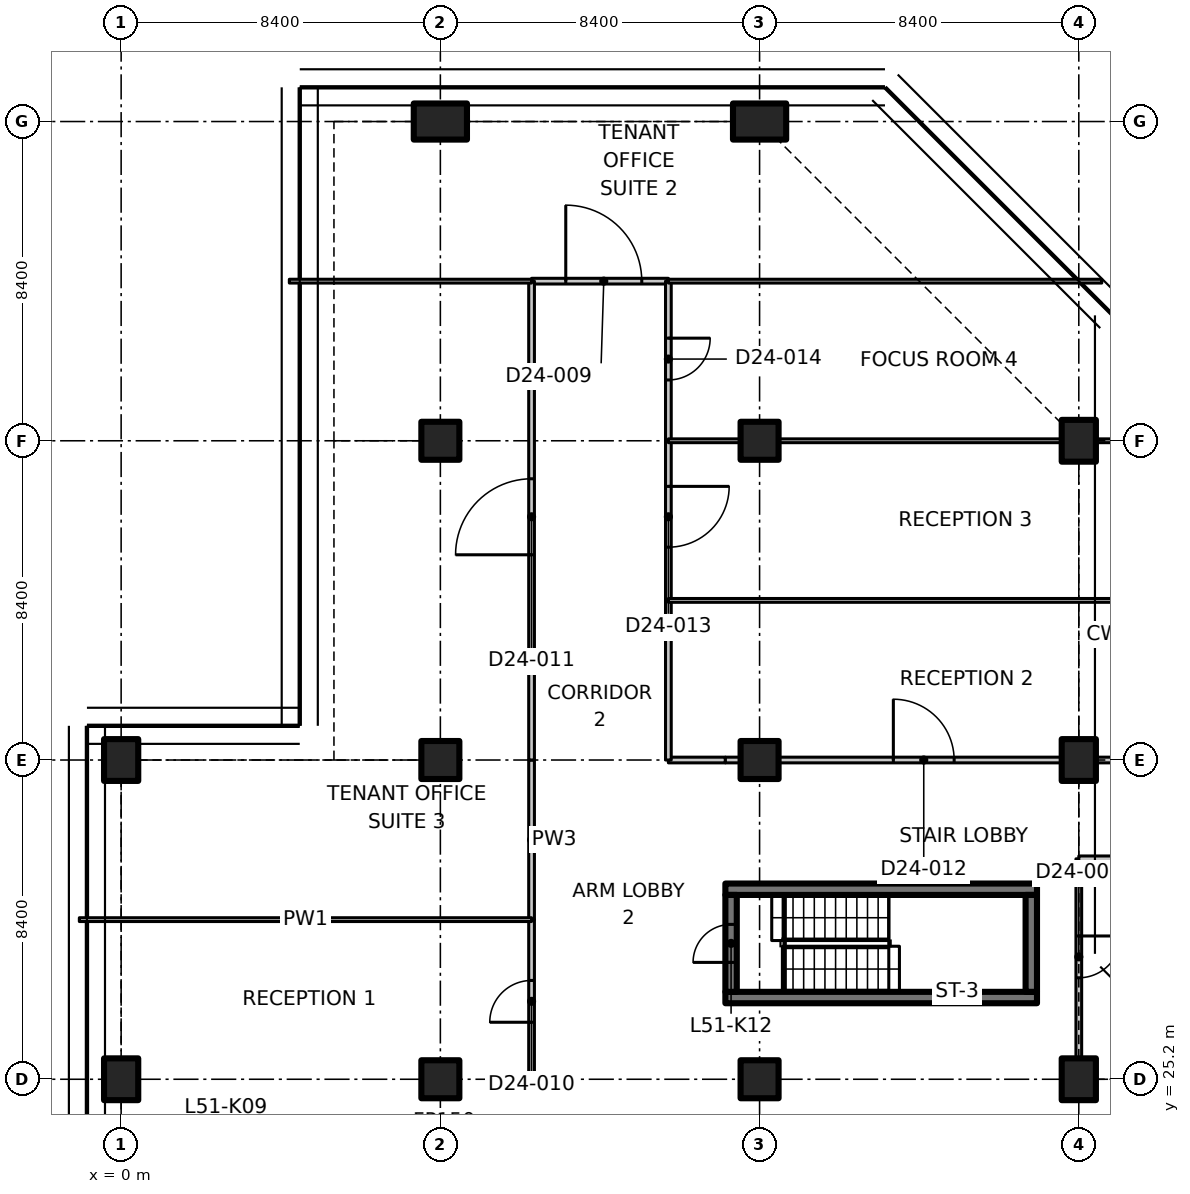
"""IFC4 building model, lengths in metres.
Left out: names, types, materials, properties, quantities, classifications, styles, units other than length and angle.
Written with IfcOpenShell. Run it as: python <this file> out.ifc"""

import sys

from ifc_helpers import new_model, si_unit, direction, frame, frame_2d, origin, origin_2d, place, context, subcontext, project, spatial, polyline, rectangle, outline, extrude, element, fill, save


model = new_model("IFC4")
c1 = context("Model", 3, precision=1e-05, world=origin(), true_north=direction((0.0, 1.0)))
c2 = subcontext(c1, "Body", "Model", "MODEL_VIEW")
j1 = project(units=[si_unit("LENGTHUNIT", "METRE"), si_unit("PLANEANGLEUNIT", "RADIAN")], contexts=[c1])
p1 = place(None, origin())
s1 = spatial("IfcSite", under=j1, at=p1, CompositionType="ELEMENT")
p2 = place(p1, origin())
s2 = spatial("IfcBuilding", under=s1, at=p2, CompositionType="ELEMENT")
p3 = place(p2, frame((0.0, 0.0, 202.8)))
s3 = spatial("IfcBuildingStorey", under=s2, at=p3, CompositionType="ELEMENT", Elevation=202.8)
for number, where, z_axis, x_axis in (
    (1, (0.0, 25.2, 0.0), (0.0, 0.0, 1.0), (1.0, 0.0, 0.0)),
    (2, (0.0, 33.6, 0.0), (0.0, 0.0, 1.0), (1.0, 0.0, 0.0)),
):
    element("IfcColumn", number, at=place(p3, frame(where, z_axis=z_axis, x_axis=x_axis)), inside=s3, PredefinedType="COLUMN", context=c2, shape_type="SweptSolid", body=[
        extrude(rectangle(XDim=0.9, YDim=1.1, at=origin_2d()), origin(), (0.0, 0.0, 1.0), 3.3),
    ])
for number, where, z_axis, x_axis in (
    (3, (8.4, 25.2, 0.0), (0.0, 0.0, 1.0), (1.0, 0.0, 0.0)),
    (4, (8.4, 33.6, 0.0), (0.0, 0.0, 1.0), (1.0, 0.0, 0.0)),
    (5, (8.4, 42.0, 0.0), (0.0, 0.0, 1.0), (1.0, 0.0, 0.0)),
):
    element("IfcColumn", number, at=place(p3, frame(where, z_axis=z_axis, x_axis=x_axis)), inside=s3, PredefinedType="COLUMN", context=c2, shape_type="SweptSolid", body=[
        extrude(rectangle(XDim=1.0, YDim=1.0, at=origin_2d()), origin(), (0.0, 0.0, 1.0), 3.3),
    ])
p4 = place(p3, frame((8.4, 50.4, 0.0), z_axis=(0.0, 0.0, 1.0), x_axis=(0.0, 1.0, 0.0)))
e6 = element("IfcColumn", 6, at=p4, inside=s3, PredefinedType="COLUMN", context=c2, shape_type="SweptSolid", body=[
    extrude(rectangle(XDim=0.95, YDim=1.4, at=origin_2d()), origin(), (0.0, 0.0, 1.0), 3.3),
])
for number, where, z_axis, x_axis in (
    (7, (16.8, 25.2, 0.0), (0.0, 0.0, 1.0), (1.0, 0.0, 0.0)),
    (8, (16.8, 33.6, 0.0), (0.0, 0.0, 1.0), (1.0, 0.0, 0.0)),
    (9, (16.8, 42.0, 0.0), (0.0, 0.0, 1.0), (1.0, 0.0, 0.0)),
):
    element("IfcColumn", number, at=place(p3, frame(where, z_axis=z_axis, x_axis=x_axis)), inside=s3, PredefinedType="COLUMN", context=c2, shape_type="SweptSolid", body=[
        extrude(rectangle(XDim=1.0, YDim=1.0, at=origin_2d()), origin(), (0.0, 0.0, 1.0), 3.3),
    ])
p5 = place(p3, frame((16.8, 50.4, 0.0), z_axis=(0.0, 0.0, 1.0), x_axis=(0.0, 1.0, 0.0)))
e10 = element("IfcColumn", 10, at=p5, inside=s3, PredefinedType="COLUMN", context=c2, shape_type="SweptSolid", body=[
    extrude(rectangle(XDim=0.95, YDim=1.4, at=origin_2d()), origin(), (0.0, 0.0, 1.0), 3.3),
])
for number, where, z_axis, x_axis in (
    (11, (25.2, 25.2, 0.0), (0.0, 0.0, 1.0), (1.0, 0.0, 0.0)),
    (12, (25.2, 33.6, 0.0), (0.0, 0.0, 1.0), (1.0, 0.0, 0.0)),
    (13, (25.2, 42.0, 0.0), (0.0, 0.0, 1.0), (1.0, 0.0, 0.0)),
):
    element("IfcColumn", number, at=place(p3, frame(where, z_axis=z_axis, x_axis=x_axis)), inside=s3, PredefinedType="COLUMN", context=c2, shape_type="SweptSolid", body=[
        extrude(rectangle(XDim=0.9, YDim=1.1, at=origin_2d()), origin(), (0.0, 0.0, 1.0), 3.3),
    ])
for number, where, z_axis, x_axis in (
    (14, (15.9, 27.35, 0.0), (0.0, 0.0, 1.0), (1.0, 0.0, 0.0)),
    (15, (15.9, 30.2, 0.0), (0.0, 0.0, 1.0), (1.0, 0.0, 0.0)),
):
    element("IfcWall", number, at=place(p3, frame(where, z_axis=z_axis, x_axis=x_axis)), inside=s3, PredefinedType="SHEAR", context=c2, shape_type="SweptSolid", body=[
        extrude(rectangle(XDim=8.2, YDim=0.3, at=frame_2d((4.1, 0.0))), origin(), (0.0, 0.0, 1.0), 3.3),
    ])
p6 = place(p3, frame((16.05, 27.5, 0.0), z_axis=(0.0, 0.0, 1.0), x_axis=(0.0, 1.0, 0.0)))
e16 = element("IfcWall", 16, at=p6, inside=s3, PredefinedType="SHEAR", context=c2, shape_type="SweptSolid", body=[
    extrude(rectangle(XDim=2.55, YDim=0.3, at=frame_2d((1.275, 0.0))), origin(), (0.0, 0.0, 1.0), 3.3),
])
p7 = place(p6, frame((0.775, 0.0, 0.0)))
e17 = element("IfcOpeningElement", 17, at=p7, cuts=e16, PredefinedType="OPENING", context=c2, shape_type="SweptSolid", body=[
    extrude(rectangle(XDim=1.0, YDim=2.1, at=frame_2d((0.5, 1.05))), frame((0.0, 0.16, 0.0), z_axis=(0.0, -1.0, 0.0), x_axis=(1.0, 0.0, 0.0)), (0.0, 0.0, 1.0), 0.32),
])
p8 = place(p3, frame((23.95, 27.5, 0.0), z_axis=(0.0, 0.0, 1.0), x_axis=(0.0, 1.0, 0.0)))
e18 = element("IfcWall", 18, at=p8, inside=s3, PredefinedType="SHEAR", context=c2, shape_type="SweptSolid", body=[
    extrude(rectangle(XDim=2.55, YDim=0.3, at=frame_2d((1.275, 0.0))), origin(), (0.0, 0.0, 1.0), 3.3),
])
p9 = place(p3, frame((25.2, 31.0, 0.0), z_axis=(0.0, 0.0, 1.0), x_axis=(0.0, -1.0, 0.0)))
e19 = element("IfcWall", 19, at=p9, inside=s3, PredefinedType="PARTITIONING", context=c2, shape_type="SweptSolid", body=[
    extrude(outline(polyline([(0.0, 0.0), (5.23, 0.0), (5.23, 2.93), (0.0, 2.93), (0.0, 0.0)])), frame((0.0, 0.075, 0.0), z_axis=(0.0, -1.0, 0.0), x_axis=(1.0, 0.0, 0.0)), (0.0, 0.0, 1.0), 0.15),
])
p10 = place(p9, frame((2.03, 0.0, 0.0)))
e20 = element("IfcOpeningElement", 20, at=p10, cuts=e19, PredefinedType="OPENING", context=c2, shape_type="SweptSolid", body=[
    extrude(rectangle(XDim=1.1, YDim=2.1, at=frame_2d((0.55, 1.05))), frame((0.0, 0.085, 0.0), z_axis=(0.0, -1.0, 0.0), x_axis=(1.0, 0.0, 0.0)), (0.0, 0.0, 1.0), 0.17),
])
p11 = place(p3, frame((25.2, 31.0, 0.0), z_axis=(0.0, 0.0, 1.0), x_axis=(1.0, 0.0, 0.0)))
e21 = element("IfcWall", 21, at=p11, inside=s3, PredefinedType="PARTITIONING", context=c2, shape_type="SweptSolid", body=[
    extrude(rectangle(XDim=3.806, YDim=0.15, at=frame_2d((1.903, 0.0))), origin(), (0.0, 0.0, 1.0), 2.93),
])
p12 = place(p3, frame((10.8, 25.2, 0.0), z_axis=(0.0, 0.0, 1.0), x_axis=(0.0, 1.0, 0.0)))
e22 = element("IfcWall", 22, at=p12, inside=s3, PredefinedType="PARTITIONING", context=c2, shape_type="SweptSolid", body=[
    extrude(rectangle(XDim=4.2, YDim=0.15, at=frame_2d((2.1, 0.0))), origin(), (0.0, 0.0, 1.0), 3.28),
])
p13 = place(p12, frame((1.5, 0.0, 0.0)))
e23 = element("IfcOpeningElement", 23, at=p13, cuts=e22, PredefinedType="OPENING", context=c2, shape_type="SweptSolid", body=[
    extrude(rectangle(XDim=1.1, YDim=2.1, at=frame_2d((0.55, 1.05))), frame((0.0, 0.085, 0.0), z_axis=(0.0, -1.0, 0.0), x_axis=(1.0, 0.0, 0.0)), (0.0, 0.0, 1.0), 0.17),
])
p14 = place(p3, frame((10.8, 29.4, 0.0), z_axis=(0.0, 0.0, 1.0), x_axis=(0.0, 1.0, 0.0)))
e24 = element("IfcWall", 24, at=p14, inside=s3, PredefinedType="PARTITIONING", context=c2, shape_type="SweptSolid", body=[
    extrude(rectangle(XDim=4.2, YDim=0.15, at=frame_2d((2.1, 0.0))), origin(), (0.0, 0.0, 1.0), 3.28),
])
p15 = place(p3, frame((14.4, 33.6, 0.0), z_axis=(0.0, 0.0, 1.0), x_axis=(1.0, 0.0, 0.0)))
e25 = element("IfcWall", 25, at=p15, inside=s3, PredefinedType="PARTITIONING", context=c2, shape_type="SweptSolid", body=[
    extrude(rectangle(XDim=1.5, YDim=0.15, at=frame_2d((0.75, 0.0))), origin(), (0.0, 0.0, 1.0), 3.28),
])
p16 = place(p3, frame((15.9, 33.6, 0.0), z_axis=(0.0, 0.0, 1.0), x_axis=(1.0, 0.0, 0.0)))
e26 = element("IfcWall", 26, at=p16, inside=s3, PredefinedType="PARTITIONING", context=c2, shape_type="SweptSolid", body=[
    extrude(rectangle(XDim=0.38, YDim=0.15, at=frame_2d((0.19, 0.0))), origin(), (0.0, 0.0, 1.0), 3.28),
])
p17 = place(p3, frame((17.32, 33.6, 0.0), z_axis=(0.0, 0.0, 1.0), x_axis=(1.0, 0.0, 0.0)))
e27 = element("IfcWall", 27, at=p17, inside=s3, PredefinedType="PARTITIONING", context=c2, shape_type="SweptSolid", body=[
    extrude(rectangle(XDim=7.41, YDim=0.15, at=frame_2d((3.705, 0.0))), origin(), (0.0, 0.0, 1.0), 3.28),
])
p18 = place(p17, frame((3.0, 0.0, 0.0)))
e28 = element("IfcOpeningElement", 28, at=p18, cuts=e27, PredefinedType="OPENING", context=c2, shape_type="SweptSolid", body=[
    extrude(rectangle(XDim=1.6, YDim=2.1, at=frame_2d((0.8, 1.05))), frame((0.0, 0.085, 0.0), z_axis=(0.0, -1.0, 0.0), x_axis=(1.0, 0.0, 0.0)), (0.0, 0.0, 1.0), 0.17),
])
p19 = place(p3, frame((25.67, 33.6, 0.0), z_axis=(0.0, 0.0, 1.0), x_axis=(1.0, 0.0, 0.0)))
e29 = element("IfcWall", 29, at=p19, inside=s3, PredefinedType="PARTITIONING", context=c2, shape_type="SweptSolid", body=[
    extrude(rectangle(XDim=4.318, YDim=0.15, at=frame_2d((2.159, 0.0))), origin(), (0.0, 0.0, 1.0), 2.93),
])
p20 = place(p3, frame((10.8, 46.2, 0.0), z_axis=(0.0, 0.0, 1.0), x_axis=(1.0, 0.0, 0.0)))
e30 = element("IfcWall", 30, at=p20, inside=s3, PredefinedType="PARTITIONING", context=c2, shape_type="SweptSolid", body=[
    extrude(rectangle(XDim=3.6, YDim=0.15, at=frame_2d((1.8, 0.0))), origin(), (0.0, 0.0, 1.0), 3.28),
])
p21 = place(p20, frame((0.9, 0.0, 0.0)))
e31 = element("IfcOpeningElement", 31, at=p21, cuts=e30, PredefinedType="OPENING", context=c2, shape_type="SweptSolid", body=[
    extrude(rectangle(XDim=2.0, YDim=2.4, at=frame_2d((1.0, 1.2))), frame((0.0, 0.085, 0.0), z_axis=(0.0, -1.0, 0.0), x_axis=(1.0, 0.0, 0.0)), (0.0, 0.0, 1.0), 0.17),
])
p22 = place(p3, frame((10.8, 33.6, 0.0), z_axis=(0.0, 0.0, 1.0), x_axis=(0.0, 1.0, 0.0)))
e32 = element("IfcWall", 32, at=p22, inside=s3, PredefinedType="PARTITIONING", context=c2, shape_type="SweptSolid", body=[
    extrude(rectangle(XDim=12.6, YDim=0.15, at=frame_2d((6.3, 0.0))), origin(), (0.0, 0.0, 1.0), 3.28),
])
p23 = place(p22, frame((5.4, 0.0, 0.0)))
e33 = element("IfcOpeningElement", 33, at=p23, cuts=e32, PredefinedType="OPENING", context=c2, shape_type="SweptSolid", body=[
    extrude(rectangle(XDim=2.0, YDim=2.4, at=frame_2d((1.0, 1.2))), frame((0.0, 0.085, 0.0), z_axis=(0.0, -1.0, 0.0), x_axis=(1.0, 0.0, 0.0)), (0.0, 0.0, 1.0), 0.17),
])
p24 = place(p3, frame((14.4, 37.8, 0.0), z_axis=(0.0, 0.0, 1.0), x_axis=(0.0, -1.0, 0.0)))
e34 = element("IfcWall", 34, at=p24, inside=s3, PredefinedType="PARTITIONING", context=c2, shape_type="SweptSolid", body=[
    extrude(rectangle(XDim=4.2, YDim=0.15, at=frame_2d((2.1, 0.0))), origin(), (0.0, 0.0, 1.0), 3.28),
])
p25 = place(p3, frame((14.4, 42.0, 0.0), z_axis=(0.0, 0.0, 1.0), x_axis=(0.0, -1.0, 0.0)))
e35 = element("IfcWall", 35, at=p25, inside=s3, PredefinedType="PARTITIONING", context=c2, shape_type="SweptSolid", body=[
    extrude(rectangle(XDim=4.2, YDim=0.15, at=frame_2d((2.1, 0.0))), origin(), (0.0, 0.0, 1.0), 3.28),
])
p26 = place(p25, frame((1.2, 0.0, 0.0)))
e36 = element("IfcOpeningElement", 36, at=p26, cuts=e35, PredefinedType="OPENING", context=c2, shape_type="SweptSolid", body=[
    extrude(rectangle(XDim=1.6, YDim=2.1, at=frame_2d((0.8, 1.05))), frame((0.0, 0.085, 0.0), z_axis=(0.0, -1.0, 0.0), x_axis=(1.0, 0.0, 0.0)), (0.0, 0.0, 1.0), 0.17),
])
p27 = place(p3, frame((14.4, 46.2, 0.0), z_axis=(0.0, 0.0, 1.0), x_axis=(0.0, -1.0, 0.0)))
e37 = element("IfcWall", 37, at=p27, inside=s3, PredefinedType="PARTITIONING", context=c2, shape_type="SweptSolid", body=[
    extrude(rectangle(XDim=4.2, YDim=0.15, at=frame_2d((2.1, 0.0))), origin(), (0.0, 0.0, 1.0), 3.28),
])
p28 = place(p27, frame((1.5, 0.0, 0.0)))
e38 = element("IfcOpeningElement", 38, at=p28, cuts=e37, PredefinedType="OPENING", context=c2, shape_type="SweptSolid", body=[
    extrude(rectangle(XDim=1.1, YDim=2.1, at=frame_2d((0.55, 1.05))), frame((0.0, 0.085, 0.0), z_axis=(0.0, -1.0, 0.0), x_axis=(1.0, 0.0, 0.0)), (0.0, 0.0, 1.0), 0.17),
])
p29 = place(p3, frame((10.8, 46.2, 0.0), z_axis=(0.0, 0.0, 1.0), x_axis=(-1.0, 0.0, 0.0)))
e39 = element("IfcWall", 39, at=p29, inside=s3, PredefinedType="PARTITIONING", context=c2, shape_type="SweptSolid", body=[
    extrude(outline(polyline([(0.0, 0.0), (6.374, 0.0), (6.374, 3.28), (6.3, 3.28), (5.65, 3.28), (5.648, 2.93), (4.752, 2.93), (4.75, 3.28), (0.0, 3.28), (0.0, 0.0)])), frame((0.0, 0.05, 0.0), z_axis=(0.0, -1.0, 0.0), x_axis=(1.0, 0.0, 0.0)), (0.0, 0.0, 1.0), 0.1),
])
p30 = place(p3, frame((25.805, 46.2, 0.0), z_axis=(0.0, 0.0, 1.0), x_axis=(-1.0, 0.0, 0.0)))
e40 = element("IfcWall", 40, at=p30, inside=s3, PredefinedType="PARTITIONING", context=c2, shape_type="SweptSolid", body=[
    extrude(outline(polyline([(0.0, 0.0), (11.406, 0.0), (11.406, 3.28), (5.471, 3.28), (5.469, 2.93), (4.142, 2.93), (4.14, 3.28), (0.406, 3.28), (0.0, 3.28), (0.0, 0.0)])), frame((0.0, 0.05, 0.0), z_axis=(0.0, -1.0, 0.0), x_axis=(1.0, 0.0, 0.0)), (0.0, 0.0, 1.0), 0.1),
])
p31 = place(p3, frame((-1.1, 29.4, 0.0), z_axis=(0.0, 0.0, 1.0), x_axis=(1.0, 0.0, 0.0)))
e41 = element("IfcWall", 41, at=p31, inside=s3, PredefinedType="PARTITIONING", context=c2, shape_type="SweptSolid", body=[
    extrude(outline(polyline([(0.0, 0.0), (11.9, 0.0), (11.9, 3.28), (1.55, 3.28), (1.548, 2.93), (0.652, 2.93), (0.65, 3.28), (0.0, 3.28), (0.0, 0.0)])), frame((0.0, 0.05, 0.0), z_axis=(0.0, -1.0, 0.0), x_axis=(1.0, 0.0, 0.0)), (0.0, 0.0, 1.0), 0.1),
])
p32 = place(p3, frame((14.4, 37.8, 0.0), z_axis=(0.0, 0.0, 1.0), x_axis=(1.0, 0.0, 0.0)))
e42 = element("IfcWall", 42, at=p32, inside=s3, PredefinedType="PARTITIONING", context=c2, shape_type="SweptSolid", body=[
    extrude(outline(polyline([(0.0, 0.0), (16.126, 0.0), (16.126, 3.28), (15.843, 3.28), (11.25, 3.28), (11.248, 2.93), (10.352, 2.93), (10.35, 3.28), (0.0, 3.28), (0.0, 0.0)])), frame((0.0, 0.05, 0.0), z_axis=(0.0, -1.0, 0.0), x_axis=(1.0, 0.0, 0.0)), (0.0, 0.0, 1.0), 0.1),
])
p33 = place(p3, frame((14.4, 42.0, 0.0), z_axis=(0.0, 0.0, 1.0), x_axis=(1.0, 0.0, 0.0)))
e43 = element("IfcWall", 43, at=p33, inside=s3, PredefinedType="PARTITIONING", context=c2, shape_type="SweptSolid", body=[
    extrude(rectangle(XDim=1.88, YDim=0.1, at=frame_2d((0.94, 0.0))), origin(), (0.0, 0.0, 1.0), 3.28),
])
p34 = place(p3, frame((17.32, 42.0, 0.0), z_axis=(0.0, 0.0, 1.0), x_axis=(1.0, 0.0, 0.0)))
e44 = element("IfcWall", 44, at=p34, inside=s3, PredefinedType="PARTITIONING", context=c2, shape_type="SweptSolid", body=[
    extrude(outline(polyline([(0.0, 0.0), (7.41, 0.0), (7.41, 2.93), (7.216, 2.93), (7.214, 3.28), (0.0, 3.28), (0.0, 0.0)])), frame((0.0, 0.05, 0.0), z_axis=(0.0, -1.0, 0.0), x_axis=(1.0, 0.0, 0.0)), (0.0, 0.0, 1.0), 0.1),
])
p35 = place(p3, frame((25.67, 42.0, 0.0), z_axis=(0.0, 0.0, 1.0), x_axis=(1.0, 0.0, 0.0)))
e45 = element("IfcWall", 45, at=p35, inside=s3, PredefinedType="PARTITIONING", context=c2, shape_type="SweptSolid", body=[
    extrude(rectangle(XDim=3.342, YDim=0.1, at=frame_2d((1.671, 0.0))), origin(), (0.0, 0.0, 1.0), 2.93),
])
p36 = place(p7, origin())
e46 = element("IfcDoor", 46, at=p36, inside=s3, OperationType="SINGLE_SWING_RIGHT", PredefinedType="DOOR", context=c2, shape_type="SweptSolid", body=[
    extrude(rectangle(XDim=1.0, YDim=2.1, at=frame_2d((0.5, 1.05))), frame((0.0, 0.025, 0.0), z_axis=(0.0, -1.0, 0.0), x_axis=(1.0, 0.0, 0.0)), (0.0, 0.0, 1.0), 0.05),
])
fill(e17, e46)
p37 = place(p10, origin())
e47 = element("IfcDoor", 47, at=p37, inside=s3, OperationType="SINGLE_SWING_RIGHT", PredefinedType="DOOR", context=c2, shape_type="SweptSolid", body=[
    extrude(rectangle(XDim=1.1, YDim=2.1, at=frame_2d((0.55, 1.05))), frame((0.0, 0.025, 0.0), z_axis=(0.0, -1.0, 0.0), x_axis=(1.0, 0.0, 0.0)), (0.0, 0.0, 1.0), 0.05),
])
fill(e20, e47)
p38 = place(p21, origin())
e48 = element("IfcDoor", 48, at=p38, inside=s3, OperationType="DOUBLE_DOOR_SINGLE_SWING", PredefinedType="DOOR", context=c2, shape_type="SweptSolid", body=[
    extrude(rectangle(XDim=2.0, YDim=2.4, at=frame_2d((1.0, 1.2))), frame((0.0, 0.025, 0.0), z_axis=(0.0, -1.0, 0.0), x_axis=(1.0, 0.0, 0.0)), (0.0, 0.0, 1.0), 0.05),
])
fill(e31, e48)
p39 = place(p13, origin())
e49 = element("IfcDoor", 49, at=p39, inside=s3, OperationType="SINGLE_SWING_LEFT", PredefinedType="DOOR", context=c2, shape_type="SweptSolid", body=[
    extrude(rectangle(XDim=1.1, YDim=2.1, at=frame_2d((0.55, 1.05))), frame((0.0, 0.025, 0.0), z_axis=(0.0, -1.0, 0.0), x_axis=(1.0, 0.0, 0.0)), (0.0, 0.0, 1.0), 0.05),
])
fill(e23, e49)
p40 = place(p23, origin())
e50 = element("IfcDoor", 50, at=p40, inside=s3, OperationType="DOUBLE_DOOR_SINGLE_SWING", PredefinedType="DOOR", context=c2, shape_type="SweptSolid", body=[
    extrude(rectangle(XDim=2.0, YDim=2.4, at=frame_2d((1.0, 1.2))), frame((0.0, 0.025, 0.0), z_axis=(0.0, -1.0, 0.0), x_axis=(1.0, 0.0, 0.0)), (0.0, 0.0, 1.0), 0.05),
])
fill(e33, e50)
p41 = place(p18, origin())
e51 = element("IfcDoor", 51, at=p41, inside=s3, OperationType="DOUBLE_DOOR_SINGLE_SWING", PredefinedType="DOOR", context=c2, shape_type="SweptSolid", body=[
    extrude(rectangle(XDim=1.6, YDim=2.1, at=frame_2d((0.8, 1.05))), frame((0.0, 0.025, 0.0), z_axis=(0.0, -1.0, 0.0), x_axis=(1.0, 0.0, 0.0)), (0.0, 0.0, 1.0), 0.05),
])
fill(e28, e51)
p42 = place(p26, origin())
e52 = element("IfcDoor", 52, at=p42, inside=s3, OperationType="DOUBLE_DOOR_SINGLE_SWING", PredefinedType="DOOR", context=c2, shape_type="SweptSolid", body=[
    extrude(rectangle(XDim=1.6, YDim=2.1, at=frame_2d((0.8, 1.05))), frame((0.0, 0.025, 0.0), z_axis=(0.0, -1.0, 0.0), x_axis=(1.0, 0.0, 0.0)), (0.0, 0.0, 1.0), 0.05),
])
fill(e36, e52)
p43 = place(p28, origin())
e53 = element("IfcDoor", 53, at=p43, inside=s3, OperationType="SINGLE_SWING_LEFT", PredefinedType="DOOR", context=c2, shape_type="SweptSolid", body=[
    extrude(rectangle(XDim=1.1, YDim=2.1, at=frame_2d((0.55, 1.05))), frame((0.0, 0.025, 0.0), z_axis=(0.0, -1.0, 0.0), x_axis=(1.0, 0.0, 0.0)), (0.0, 0.0, 1.0), 0.05),
])
fill(e38, e53)
save(model, sys.argv[1])
